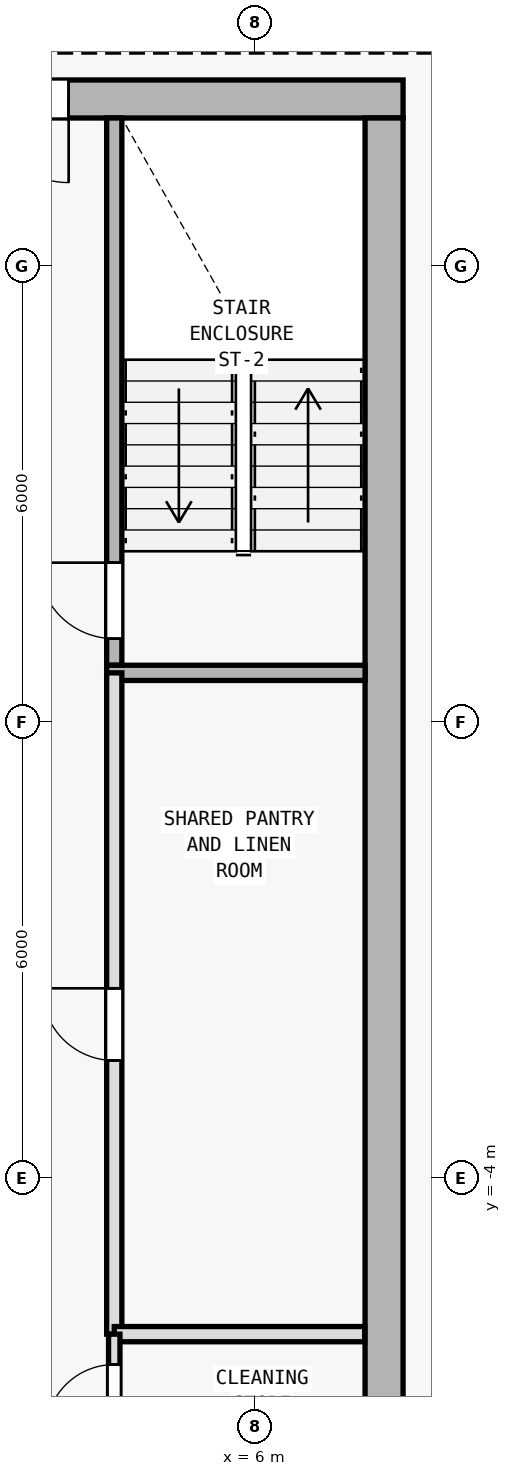
"""IFC4 building model, lengths in metres.
Left out: names, types, materials, properties, quantities, classifications, styles, units other than length and angle.
Written with IfcOpenShell. Run it as: python <this file> out.ifc"""

import sys

from ifc_helpers import new_model, si_unit, direction, frame, frame_2d, origin, origin_2d, place, context, subcontext, project, spatial, rectangle, i_section, extrude, element, fill, save


model = new_model("IFC4")
c1 = context("Model", 3, precision=1e-05, world=origin(), true_north=direction((0.0, 1.0)))
c2 = subcontext(c1, "Body", "Model", "MODEL_VIEW")
j1 = project(units=[si_unit("LENGTHUNIT", "METRE"), si_unit("PLANEANGLEUNIT", "RADIAN")], contexts=[c1])
p1 = place(None, origin())
s1 = spatial("IfcSite", under=j1, at=p1, CompositionType="ELEMENT")
p2 = place(p1, origin())
s2 = spatial("IfcBuilding", under=s1, at=p2, CompositionType="ELEMENT")
p3 = place(p2, frame((0.0, 0.0, 145.8)))
s3 = spatial("IfcBuildingStorey", under=s2, at=p3, CompositionType="ELEMENT", Elevation=145.8)
for number, where, z_axis, x_axis in (
    (1, (7.7, 10.2, 0.0), (0.0, 0.0, 1.0), (1.0, 0.0, 0.0)),
    (2, (7.7, 0.4, 0.0), (0.0, 0.0, 1.0), (1.0, 0.0, 0.0)),
):
    element("IfcColumn", number, at=place(p3, frame(where, z_axis=z_axis, x_axis=x_axis)), inside=s3, PredefinedType="COLUMN", context=c2, shape_type="SweptSolid", body=[
        extrude(i_section(OverallWidth=0.404, OverallDepth=0.407, WebThickness=0.017, FlangeThickness=0.028, FilletRadius=0.015, at=origin_2d()), origin(), (0.0, 0.0, 1.0), 3.6),
    ])
p4 = place(p3, frame((7.95, 10.2, 0.0), z_axis=(0.0, 0.0, 1.0), x_axis=(-1.0, 0.0, 0.0)))
e3 = element("IfcWall", 3, at=p4, inside=s3, PredefinedType="SHEAR", context=c2, shape_type="SweptSolid", body=[
    extrude(rectangle(XDim=15.9, YDim=0.5, at=frame_2d((7.95, 0.0))), origin(), (0.0, 0.0, 1.0), 3.35),
])
p5 = place(p4, frame((4.4, 0.0, 0.0)))
e4 = element("IfcOpeningElement", 4, at=p5, cuts=e3, PredefinedType="OPENING", context=c2, shape_type="SweptSolid", body=[
    extrude(rectangle(XDim=1.1, YDim=2.15, at=frame_2d((0.55, 1.075))), frame((0.0, 0.26, 0.0), z_axis=(0.0, -1.0, 0.0), x_axis=(1.0, 0.0, 0.0)), (0.0, 0.0, 1.0), 0.52),
])
p6 = place(p3, frame((7.7, 9.95, 0.0), z_axis=(0.0, 0.0, 1.0), x_axis=(0.0, -1.0, 0.0)))
e5 = element("IfcWall", 5, at=p6, inside=s3, PredefinedType="SHEAR", context=c2, shape_type="SweptSolid", body=[
    extrude(rectangle(XDim=19.1, YDim=0.5, at=frame_2d((9.55, 0.0))), origin(), (0.0, 0.0, 1.0), 3.35),
])
p7 = place(p3, frame((4.15, 2.75, 0.0), z_axis=(0.0, 0.0, 1.0), x_axis=(0.0, 1.0, 0.0)))
e6 = element("IfcWall", 6, at=p7, inside=s3, PredefinedType="SOLIDWALL", context=c2, shape_type="SweptSolid", body=[
    extrude(rectangle(XDim=7.2, YDim=0.2, at=frame_2d((3.6, 0.0))), origin(), (0.0, 0.0, 1.0), 3.35),
])
p8 = place(p7, frame((0.35, 0.0, 0.0)))
e7 = element("IfcOpeningElement", 7, at=p8, cuts=e6, PredefinedType="OPENING", context=c2, shape_type="SweptSolid", body=[
    extrude(rectangle(XDim=1.0, YDim=2.15, at=frame_2d((0.5, 1.075))), frame((0.0, 0.11, 0.0), z_axis=(0.0, -1.0, 0.0), x_axis=(1.0, 0.0, 0.0)), (0.0, 0.0, 1.0), 0.22),
])
p9 = place(p3, frame((4.05, 2.65, 0.0), z_axis=(0.0, 0.0, 1.0), x_axis=(1.0, 0.0, 0.0)))
e8 = element("IfcWall", 8, at=p9, inside=s3, PredefinedType="SOLIDWALL", context=c2, shape_type="SweptSolid", body=[
    extrude(rectangle(XDim=3.4, YDim=0.2, at=frame_2d((1.7, 0.0))), origin(), (0.0, 0.0, 1.0), 3.35),
])
p10 = place(p3, frame((4.15, -6.05, 0.0), z_axis=(0.0, 0.0, 1.0), x_axis=(0.0, 1.0, 0.0)))
e9 = element("IfcWall", 9, at=p10, inside=s3, PredefinedType="SOLIDWALL", context=c2, shape_type="SweptSolid", body=[
    extrude(rectangle(XDim=8.7, YDim=0.2, at=frame_2d((4.35, 0.0))), origin(), (0.0, 0.0, 1.0), 3.35),
])
p11 = place(p10, frame((3.6, 0.0, 0.0)))
e10 = element("IfcOpeningElement", 10, at=p11, cuts=e9, PredefinedType="OPENING", context=c2, shape_type="SweptSolid", body=[
    extrude(rectangle(XDim=0.95, YDim=2.1, at=frame_2d((0.475, 1.05))), frame((0.0, 0.11, 0.0), z_axis=(0.0, -1.0, 0.0), x_axis=(1.0, 0.0, 0.0)), (0.0, 0.0, 1.0), 0.22),
])
p12 = place(p3, frame((4.15, -6.05, 0.0), z_axis=(0.0, 0.0, 1.0), x_axis=(1.0, 0.0, 0.0)))
e11 = element("IfcWall", 11, at=p12, inside=s3, PredefinedType="SOLIDWALL", context=c2, shape_type="SweptSolid", body=[
    extrude(rectangle(XDim=3.295, YDim=0.2, at=frame_2d((1.647, 0.0))), origin(), (0.0, 0.0, 1.0), 3.35),
])
p13 = place(p3, frame((4.15, -9.145, 0.0), z_axis=(0.0, 0.0, 1.0), x_axis=(0.0, 1.0, 0.0)))
e12 = element("IfcWall", 12, at=p13, inside=s3, PredefinedType="PARTITIONING", context=c2, shape_type="SweptSolid", body=[
    extrude(rectangle(XDim=3.095, YDim=0.15, at=frame_2d((1.547, 0.0))), origin(), (0.0, 0.0, 1.0), 3.35),
])
p14 = place(p13, frame((0.245, 0.0, 0.0)))
e13 = element("IfcOpeningElement", 13, at=p14, cuts=e12, PredefinedType="OPENING", context=c2, shape_type="SweptSolid", body=[
    extrude(rectangle(XDim=0.9, YDim=2.1, at=frame_2d((0.45, 1.05))), frame((0.0, 0.085, 0.0), z_axis=(0.0, -1.0, 0.0), x_axis=(1.0, 0.0, 0.0)), (0.0, 0.0, 1.0), 0.17),
])
p15 = place(p13, frame((1.795, 0.0, 0.0)))
e14 = element("IfcOpeningElement", 14, at=p15, cuts=e12, PredefinedType="OPENING", context=c2, shape_type="SweptSolid", body=[
    extrude(rectangle(XDim=0.9, YDim=2.1, at=frame_2d((0.45, 1.05))), frame((0.0, 0.085, 0.0), z_axis=(0.0, -1.0, 0.0), x_axis=(1.0, 0.0, 0.0)), (0.0, 0.0, 1.0), 0.17),
])
p16 = place(p3, frame((7.023, 12.36, 0.0), z_axis=(0.0, 0.0, 1.0), x_axis=(0.84376480085, -0.536713108511, 0.0)))
e15 = element("IfcWall", 15, at=p16, inside=s3, PredefinedType="PARTITIONING", context=c2, shape_type="SweptSolid", body=[
    extrude(rectangle(XDim=7.297, YDim=0.15, at=frame_2d((3.648, 0.0))), origin(), (0.0, 0.0, 1.0), 2.725),
])
p17 = place(p16, frame((3.07, 0.0, 0.0)))
e16 = element("IfcOpeningElement", 16, at=p17, cuts=e15, PredefinedType="OPENING", context=c2, shape_type="SweptSolid", body=[
    extrude(rectangle(XDim=0.9, YDim=2.1, at=frame_2d((0.45, 1.05))), frame((0.0, 0.085, 0.0), z_axis=(0.0, -1.0, 0.0), x_axis=(1.0, 0.0, 0.0)), (0.0, 0.0, 1.0), 0.17),
])
p18 = place(p5, origin())
e17 = element("IfcDoor", 17, at=p18, inside=s3, OperationType="SINGLE_SWING_LEFT", PredefinedType="DOOR", context=c2, shape_type="SweptSolid", body=[
    extrude(rectangle(XDim=1.1, YDim=2.15, at=frame_2d((0.55, 1.075))), frame((0.0, 0.025, 0.0), z_axis=(0.0, -1.0, 0.0), x_axis=(1.0, 0.0, 0.0)), (0.0, 0.0, 1.0), 0.05),
])
fill(e4, e17)
p19 = place(p8, origin())
e18 = element("IfcDoor", 18, at=p19, inside=s3, OperationType="SINGLE_SWING_RIGHT", PredefinedType="DOOR", context=c2, shape_type="SweptSolid", body=[
    extrude(rectangle(XDim=1.0, YDim=2.15, at=frame_2d((0.5, 1.075))), frame((0.0, 0.025, 0.0), z_axis=(0.0, -1.0, 0.0), x_axis=(1.0, 0.0, 0.0)), (0.0, 0.0, 1.0), 0.05),
])
fill(e7, e18)
p20 = place(p11, origin())
e19 = element("IfcDoor", 19, at=p20, inside=s3, OperationType="SINGLE_SWING_RIGHT", PredefinedType="DOOR", context=c2, shape_type="SweptSolid", body=[
    extrude(rectangle(XDim=0.95, YDim=2.1, at=frame_2d((0.475, 1.05))), frame((0.0, 0.025, 0.0), z_axis=(0.0, -1.0, 0.0), x_axis=(1.0, 0.0, 0.0)), (0.0, 0.0, 1.0), 0.05),
])
fill(e10, e19)
p21 = place(p15, origin())
e20 = element("IfcDoor", 20, at=p21, inside=s3, OperationType="SINGLE_SWING_LEFT", PredefinedType="DOOR", context=c2, shape_type="SweptSolid", body=[
    extrude(rectangle(XDim=0.9, YDim=2.1, at=frame_2d((0.45, 1.05))), frame((0.0, 0.025, 0.0), z_axis=(0.0, -1.0, 0.0), x_axis=(1.0, 0.0, 0.0)), (0.0, 0.0, 1.0), 0.05),
])
fill(e14, e20)
save(model, sys.argv[1])
